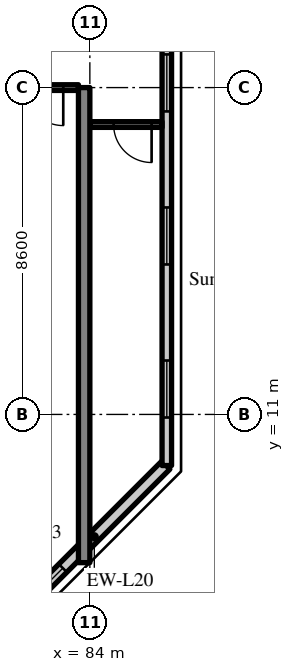
"""IFC4 building model, lengths in metres.
Left out: names, types, materials, properties, quantities, classifications, styles, units other than length and angle.
Written with IfcOpenShell. Run it as: python <this file> out.ifc"""

import sys

from ifc_helpers import new_model, si_unit, direction, frame, frame_2d, origin, place, context, subcontext, project, spatial, rectangle, extrude, source, transform, mapped, element, fill, save


model = new_model("IFC4")
c1 = context("Model", 3, precision=1e-05, world=origin(), true_north=direction((0.0, 1.0)))
c2 = subcontext(c1, "Body", "Model", "MODEL_VIEW")
j1 = project(units=[si_unit("LENGTHUNIT", "METRE"), si_unit("PLANEANGLEUNIT", "RADIAN")], contexts=[c1])
p1 = place(None, origin())
s1 = spatial("IfcSite", under=j1, at=p1, CompositionType="ELEMENT")
p2 = place(p1, origin())
s2 = spatial("IfcBuilding", under=s1, at=p2, CompositionType="ELEMENT")
p3 = place(p2, frame((0.0, 0.0, 217.9)))
s3 = spatial("IfcBuildingStorey", under=s2, at=p3, CompositionType="ELEMENT", Elevation=217.9)
m1 = source(origin(), c2, "Body", "SweptSolid", [
    extrude(rectangle(XDim=12.5, YDim=0.3, at=frame_2d((6.25, 0.0))), origin(), (0.0, 0.0, 1.0), 3.62),
])
p4 = place(p3, frame((83.85, 7.1, 0.0), z_axis=(0.0, 0.0, 1.0), x_axis=(0.0, 1.0, 0.0)))
e1 = element("IfcWall", 1, at=p4, inside=s3, PredefinedType="SHEAR", context=c2, shape_type="MappedRepresentation", body=[
    mapped(m1, transform((0.0, 0.0, 0.0), scale=1.0)),
])
m2 = source(origin(), c2, "Body", "SweptSolid", [
    extrude(rectangle(XDim=5.326, YDim=0.3, at=frame_2d((2.663, 0.0))), origin(), (0.0, 0.0, 1.0), 3.62),
])
p5 = place(p3, frame((82.234, 5.9, 0.0), z_axis=(0.0, 0.0, 1.0), x_axis=(0.707083859269, 0.707129702361, 0.0)))
e2 = element("IfcWall", 2, at=p5, inside=s3, PredefinedType="SOLIDWALL", context=c2, shape_type="MappedRepresentation", body=[
    mapped(m2, transform((0.0, 0.0, 0.0), scale=1.0)),
])
m3 = source(origin(), c2, "Body", "SweptSolid", [
    extrude(rectangle(XDim=1.2, YDim=1.5, at=frame_2d((0.6, 0.75))), frame((0.0, 0.16, 0.0), z_axis=(0.0, -1.0, 0.0), x_axis=(1.0, 0.0, 0.0)), (0.0, 0.0, 1.0), 0.32),
])
p6 = place(p5, frame((0.292, 0.0, 0.9)))
e3 = element("IfcOpeningElement", 3, at=p6, cuts=e2, PredefinedType="OPENING", context=c2, shape_type="MappedRepresentation", body=[
    mapped(m3, transform((0.0, 0.0, 0.0), scale=1.0)),
])
m4 = source(origin(), c2, "Body", "SweptSolid", [
    extrude(rectangle(XDim=28.189, YDim=0.25, at=frame_2d((14.095, 0.0))), origin(), (0.0, 0.0, 1.0), 3.62),
])
p7 = place(p3, frame((86.025, 9.655, 0.0), z_axis=(0.0, 0.0, 1.0), x_axis=(0.0, 1.0, 0.0)))
e4 = element("IfcWall", 4, at=p7, inside=s3, PredefinedType="SOLIDWALL", context=c2, shape_type="MappedRepresentation", body=[
    mapped(m4, transform((0.0, 0.0, 0.0), scale=1.0)),
])
m5 = source(origin(), c2, "Body", "SweptSolid", [
    extrude(rectangle(XDim=1.5, YDim=1.5, at=frame_2d((0.75, 0.75))), frame((0.0, 0.135, 0.0), z_axis=(0.0, -1.0, 0.0), x_axis=(1.0, 0.0, 0.0)), (0.0, 0.0, 1.0), 0.27),
])
p8 = place(p7, frame((1.263, 0.0, 0.9)))
e5 = element("IfcOpeningElement", 5, at=p8, cuts=e4, PredefinedType="OPENING", context=c2, shape_type="MappedRepresentation", body=[
    mapped(m5, transform((0.0, 0.0, 0.0), scale=1.0)),
])
p9 = place(p7, frame((5.291, 0.0, 0.9)))
e6 = element("IfcOpeningElement", 6, at=p9, cuts=e4, PredefinedType="OPENING", context=c2, shape_type="MappedRepresentation", body=[
    mapped(m5, transform((0.0, 0.0, 0.0), scale=1.0)),
])
p10 = place(p7, frame((9.318, 0.0, 0.9)))
e7 = element("IfcOpeningElement", 7, at=p10, cuts=e4, PredefinedType="OPENING", context=c2, shape_type="MappedRepresentation", body=[
    mapped(m5, transform((0.0, 0.0, 0.0), scale=1.0)),
])
p11 = place(p7, frame((13.345, 0.0, 0.9)))
e8 = element("IfcOpeningElement", 8, at=p11, cuts=e4, PredefinedType="OPENING", context=c2, shape_type="MappedRepresentation", body=[
    mapped(m5, transform((0.0, 0.0, 0.0), scale=1.0)),
])
p12 = place(p7, frame((17.372, 0.0, 0.9)))
e9 = element("IfcOpeningElement", 9, at=p12, cuts=e4, PredefinedType="OPENING", context=c2, shape_type="MappedRepresentation", body=[
    mapped(m5, transform((0.0, 0.0, 0.0), scale=1.0)),
])
p13 = place(p7, frame((21.399, 0.0, 0.9)))
e10 = element("IfcOpeningElement", 10, at=p13, cuts=e4, PredefinedType="OPENING", context=c2, shape_type="MappedRepresentation", body=[
    mapped(m5, transform((0.0, 0.0, 0.0), scale=1.0)),
])
p14 = place(p7, frame((25.426, 0.0, 0.9)))
e11 = element("IfcOpeningElement", 11, at=p14, cuts=e4, PredefinedType="OPENING", context=c2, shape_type="MappedRepresentation", body=[
    mapped(m5, transform((0.0, 0.0, 0.0), scale=1.0)),
])
m6 = source(origin(), c2, "Body", "SweptSolid", [
    extrude(rectangle(XDim=7.95, YDim=0.15, at=frame_2d((3.975, 0.0))), origin(), (0.0, 0.0, 1.0), 2.92),
])
p15 = place(p3, frame((75.75, 19.6, 0.0), z_axis=(0.0, 0.0, 1.0), x_axis=(1.0, 0.0, 0.0)))
e12 = element("IfcWall", 12, at=p15, inside=s3, PredefinedType="PARTITIONING", context=c2, shape_type="MappedRepresentation", body=[
    mapped(m6, transform((0.0, 0.0, 0.0), scale=1.0)),
])
m7 = source(origin(), c2, "Body", "SweptSolid", [
    extrude(rectangle(XDim=1.0, YDim=2.1, at=frame_2d((0.5, 1.05))), frame((0.0, 0.085, 0.0), z_axis=(0.0, -1.0, 0.0), x_axis=(1.0, 0.0, 0.0)), (0.0, 0.0, 1.0), 0.17),
])
p16 = place(p15, frame((6.55, 0.0, 0.0)))
e13 = element("IfcOpeningElement", 13, at=p16, cuts=e12, PredefinedType="OPENING", context=c2, shape_type="MappedRepresentation", body=[
    mapped(m7, transform((0.0, 0.0, 0.0), scale=1.0)),
])
m8 = source(origin(), c2, "Body", "SweptSolid", [
    extrude(rectangle(XDim=1.9, YDim=0.15, at=frame_2d((0.95, 0.0))), origin(), (0.0, 0.0, 1.0), 2.92),
])
p17 = place(p3, frame((84.0, 18.628, 0.0), z_axis=(0.0, 0.0, 1.0), x_axis=(1.0, 0.0, 0.0)))
e14 = element("IfcWall", 14, at=p17, inside=s3, PredefinedType="PARTITIONING", context=c2, shape_type="MappedRepresentation", body=[
    mapped(m8, transform((0.0, 0.0, 0.0), scale=1.0)),
])
p18 = place(p17, frame((0.625, 0.0, 0.0)))
e15 = element("IfcOpeningElement", 15, at=p18, cuts=e14, PredefinedType="OPENING", context=c2, shape_type="MappedRepresentation", body=[
    mapped(m7, transform((0.0, 0.0, 0.0), scale=1.0)),
])
m9 = source(origin(), c2, "Body", "SweptSolid", [
    extrude(rectangle(XDim=1.2, YDim=1.5, at=frame_2d((0.6, 0.75))), frame((0.0, 0.03, 0.0), z_axis=(0.0, -1.0, 0.0), x_axis=(1.0, 0.0, 0.0)), (0.0, 0.0, 1.0), 0.06),
])
p19 = place(p6, origin())
e16 = element("IfcWindow", 16, at=p19, inside=s3, PartitioningType="SINGLE_PANEL", PredefinedType="WINDOW", context=c2, shape_type="MappedRepresentation", body=[
    mapped(m9, transform((0.0, 0.0, 0.0), scale=1.0)),
])
fill(e3, e16)
m10 = source(origin(), c2, "Body", "SweptSolid", [
    extrude(rectangle(XDim=1.5, YDim=1.5, at=frame_2d((0.75, 0.75))), frame((0.0, 0.03, 0.0), z_axis=(0.0, -1.0, 0.0), x_axis=(1.0, 0.0, 0.0)), (0.0, 0.0, 1.0), 0.06),
])
p20 = place(p8, origin())
e17 = element("IfcWindow", 17, at=p20, inside=s3, PartitioningType="SINGLE_PANEL", PredefinedType="WINDOW", context=c2, shape_type="MappedRepresentation", body=[
    mapped(m10, transform((0.0, 0.0, 0.0), scale=1.0)),
])
fill(e5, e17)
p21 = place(p9, origin())
e18 = element("IfcWindow", 18, at=p21, inside=s3, PartitioningType="SINGLE_PANEL", PredefinedType="WINDOW", context=c2, shape_type="MappedRepresentation", body=[
    mapped(m10, transform((0.0, 0.0, 0.0), scale=1.0)),
])
fill(e6, e18)
p22 = place(p10, origin())
e19 = element("IfcWindow", 19, at=p22, inside=s3, PartitioningType="SINGLE_PANEL", PredefinedType="WINDOW", context=c2, shape_type="MappedRepresentation", body=[
    mapped(m10, transform((0.0, 0.0, 0.0), scale=1.0)),
])
fill(e7, e19)
m11 = source(origin(), c2, "Body", "SweptSolid", [
    extrude(rectangle(XDim=1.0, YDim=2.1, at=frame_2d((0.5, 1.05))), frame((0.0, 0.025, 0.0), z_axis=(0.0, -1.0, 0.0), x_axis=(1.0, 0.0, 0.0)), (0.0, 0.0, 1.0), 0.05),
])
p23 = place(p16, origin())
e20 = element("IfcDoor", 20, at=p23, inside=s3, OperationType="SINGLE_SWING_RIGHT", PredefinedType="DOOR", context=c2, shape_type="MappedRepresentation", body=[
    mapped(m11, transform((0.0, 0.0, 0.0), scale=1.0)),
])
fill(e13, e20)
p24 = place(p18, origin())
e21 = element("IfcDoor", 21, at=p24, inside=s3, OperationType="SINGLE_SWING_RIGHT", PredefinedType="DOOR", context=c2, shape_type="MappedRepresentation", body=[
    mapped(m11, transform((0.0, 0.0, 0.0), scale=1.0)),
])
fill(e15, e21)
save(model, sys.argv[1])
